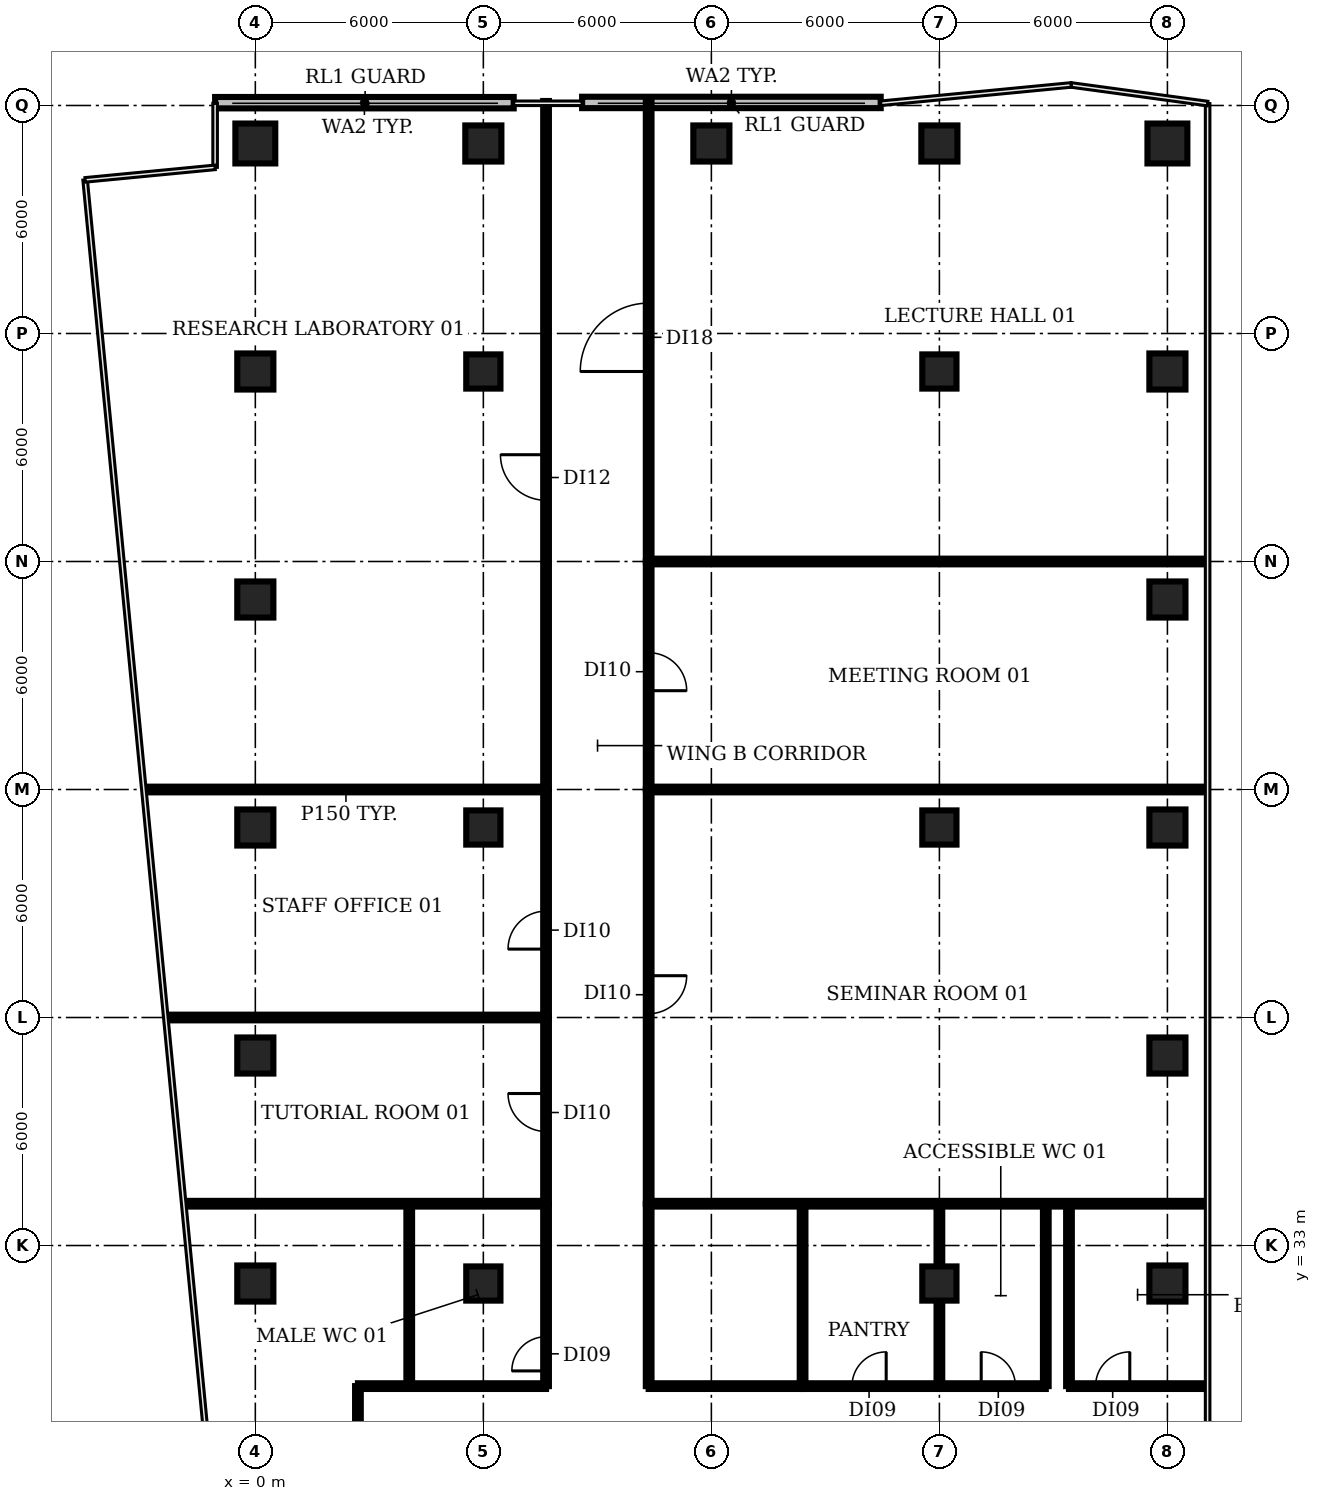
"""IFC4 building model, lengths in metres.
Left out: names, types, materials, properties, quantities, classifications, styles, units other than length and angle.
Written with IfcOpenShell. Run it as: python <this file> out.ifc"""

import sys

from ifc_helpers import new_model, si_unit, direction, frame, frame_2d, origin, origin_2d, place, context, subcontext, project, spatial, rectangle, circle, extrude, element, fill, save


model = new_model("IFC4")
c1 = context("Model", 3, precision=1e-05, world=origin(), true_north=direction((0.0, 1.0)))
c2 = subcontext(c1, "Body", "Model", "MODEL_VIEW")
j1 = project(units=[si_unit("LENGTHUNIT", "METRE"), si_unit("PLANEANGLEUNIT", "RADIAN")], contexts=[c1])
p1 = place(None, origin())
s1 = spatial("IfcSite", under=j1, at=p1, CompositionType="ELEMENT")
p2 = place(p1, origin())
s2 = spatial("IfcBuilding", under=s1, at=p2, CompositionType="ELEMENT")
p3 = place(p2, frame((0.0, 0.0, 192.8)))
s3 = spatial("IfcBuildingStorey", under=s2, at=p3, CompositionType="ELEMENT", Elevation=192.8)
for number, where, z_axis, x_axis in (
    (1, (0.0, 32.0, 0.0), (0.0, 0.0, 1.0), (1.0, 0.0, 0.0)),
    (2, (0.0, 38.0, 0.0), (0.0, 0.0, 1.0), (1.0, 0.0, 0.0)),
    (3, (0.0, 44.0, 0.0), (0.0, 0.0, 1.0), (1.0, 0.0, 0.0)),
    (4, (0.0, 50.0, 0.0), (0.0, 0.0, 1.0), (1.0, 0.0, 0.0)),
    (5, (0.0, 56.0, 0.0), (0.0, 0.0, 1.0), (1.0, 0.0, 0.0)),
):
    element("IfcColumn", number, at=place(p3, frame(where, z_axis=z_axis, x_axis=x_axis)), inside=s3, PredefinedType="COLUMN", context=c2, shape_type="SweptSolid", body=[
        extrude(rectangle(XDim=0.95, YDim=0.95, at=origin_2d()), origin(), (0.0, 0.0, 1.0), 3.2),
    ])
p4 = place(p3, frame((0.0, 62.0, 0.0), z_axis=(0.0, 0.0, 1.0), x_axis=(1.0, 0.0, 0.0)))
e6 = element("IfcColumn", 6, at=p4, inside=s3, PredefinedType="COLUMN", context=c2, shape_type="SweptSolid", body=[
    extrude(circle(Radius=0.525, at=origin_2d()), origin(), (0.0, 0.0, 1.0), 3.2),
])
for number, where, z_axis, x_axis in (
    (7, (6.0, 32.0, 0.0), (0.0, 0.0, 1.0), (1.0, 0.0, 0.0)),
    (8, (6.0, 44.0, 0.0), (0.0, 0.0, 1.0), (1.0, 0.0, 0.0)),
    (9, (6.0, 56.0, 0.0), (0.0, 0.0, 1.0), (1.0, 0.0, 0.0)),
):
    element("IfcColumn", number, at=place(p3, frame(where, z_axis=z_axis, x_axis=x_axis)), inside=s3, PredefinedType="COLUMN", context=c2, shape_type="SweptSolid", body=[
        extrude(rectangle(XDim=0.9, YDim=0.9, at=origin_2d()), origin(), (0.0, 0.0, 1.0), 3.2),
    ])
for number, where, z_axis, x_axis in (
    (10, (6.0, 62.0, 0.0), (0.0, 0.0, 1.0), (1.0, 0.0, 0.0)),
    (11, (12.0, 62.0, 0.0), (0.0, 0.0, 1.0), (1.0, 0.0, 0.0)),
):
    element("IfcColumn", number, at=place(p3, frame(where, z_axis=z_axis, x_axis=x_axis)), inside=s3, PredefinedType="COLUMN", context=c2, shape_type="SweptSolid", body=[
        extrude(rectangle(XDim=0.95, YDim=0.95, at=origin_2d()), origin(), (0.0, 0.0, 1.0), 3.2),
    ])
for number, where, z_axis, x_axis in (
    (12, (18.0, 32.0, 0.0), (0.0, 0.0, 1.0), (1.0, 0.0, 0.0)),
    (13, (18.0, 44.0, 0.0), (0.0, 0.0, 1.0), (1.0, 0.0, 0.0)),
    (14, (18.0, 56.0, 0.0), (0.0, 0.0, 1.0), (1.0, 0.0, 0.0)),
):
    element("IfcColumn", number, at=place(p3, frame(where, z_axis=z_axis, x_axis=x_axis)), inside=s3, PredefinedType="COLUMN", context=c2, shape_type="SweptSolid", body=[
        extrude(rectangle(XDim=0.9, YDim=0.9, at=origin_2d()), origin(), (0.0, 0.0, 1.0), 3.2),
    ])
for number, where, z_axis, x_axis in (
    (15, (18.0, 62.0, 0.0), (0.0, 0.0, 1.0), (1.0, 0.0, 0.0)),
    (16, (24.0, 32.0, 0.0), (0.0, 0.0, 1.0), (1.0, 0.0, 0.0)),
    (17, (24.0, 38.0, 0.0), (0.0, 0.0, 1.0), (1.0, 0.0, 0.0)),
    (18, (24.0, 44.0, 0.0), (0.0, 0.0, 1.0), (1.0, 0.0, 0.0)),
    (19, (24.0, 50.0, 0.0), (0.0, 0.0, 1.0), (1.0, 0.0, 0.0)),
    (20, (24.0, 56.0, 0.0), (0.0, 0.0, 1.0), (1.0, 0.0, 0.0)),
):
    element("IfcColumn", number, at=place(p3, frame(where, z_axis=z_axis, x_axis=x_axis)), inside=s3, PredefinedType="COLUMN", context=c2, shape_type="SweptSolid", body=[
        extrude(rectangle(XDim=0.95, YDim=0.95, at=origin_2d()), origin(), (0.0, 0.0, 1.0), 3.2),
    ])
p5 = place(p3, frame((24.0, 62.0, 0.0), z_axis=(0.0, 0.0, 1.0), x_axis=(1.0, 0.0, 0.0)))
e21 = element("IfcColumn", 21, at=p5, inside=s3, PredefinedType="COLUMN", context=c2, shape_type="SweptSolid", body=[
    extrude(circle(Radius=0.525, at=origin_2d()), origin(), (0.0, 0.0, 1.0), 3.2),
])
for number, where, z_axis, x_axis in (
    (22, (16.456, 63.08, 0.0), (0.0, 0.0, 1.0), (-1.0, 0.0, 0.0)),
    (23, (6.799, 63.074, 0.0), (0.0, 0.0, 1.0), (-1.0, 0.0, 0.0)),
):
    element("IfcWall", number, at=place(p3, frame(where, z_axis=z_axis, x_axis=x_axis)), inside=s3, PredefinedType="SOLIDWALL", context=c2, shape_type="SweptSolid", body=[
        extrude(rectangle(XDim=7.857, YDim=0.3, at=frame_2d((3.928, 0.0))), origin(), (0.0, 0.0, 1.0), 3.8),
    ])
p6 = place(p3, frame((-2.88, 45.0, 0.0), z_axis=(0.0, 0.0, 1.0), x_axis=(1.0, 0.0, 0.0)))
e24 = element("IfcWall", 24, at=p6, inside=s3, PredefinedType="PARTITIONING", context=c2, shape_type="SweptSolid", body=[
    extrude(rectangle(XDim=10.53, YDim=0.15, at=frame_2d((5.265, 0.0))), origin(), (0.0, 0.0, 1.0), 2.83),
])
p7 = place(p3, frame((-2.31, 39.0, 0.0), z_axis=(0.0, 0.0, 1.0), x_axis=(1.0, 0.0, 0.0)))
e25 = element("IfcWall", 25, at=p7, inside=s3, PredefinedType="PARTITIONING", context=c2, shape_type="SweptSolid", body=[
    extrude(rectangle(XDim=9.96, YDim=0.15, at=frame_2d((4.98, 0.0))), origin(), (0.0, 0.0, 1.0), 2.83),
])
p8 = place(p3, frame((-1.83, 34.1, 0.0), z_axis=(0.0, 0.0, 1.0), x_axis=(1.0, 0.0, 0.0)))
e26 = element("IfcWall", 26, at=p8, inside=s3, PredefinedType="PARTITIONING", context=c2, shape_type="SweptSolid", body=[
    extrude(rectangle(XDim=9.48, YDim=0.15, at=frame_2d((4.74, 0.0))), origin(), (0.0, 0.0, 1.0), 2.83),
])
p9 = place(p3, frame((2.7, 25.4, 0.0), z_axis=(0.0, 0.0, 1.0), x_axis=(0.0, 1.0, 0.0)))
e27 = element("IfcWall", 27, at=p9, inside=s3, PredefinedType="PARTITIONING", context=c2, shape_type="SweptSolid", body=[
    extrude(rectangle(XDim=3.9, YDim=0.15, at=frame_2d((1.95, 0.0))), origin(), (0.0, 0.0, 1.0), 2.83),
])
p10 = place(p3, frame((2.7, 29.3, 0.0), z_axis=(0.0, 0.0, 1.0), x_axis=(1.0, 0.0, 0.0)))
e28 = element("IfcWall", 28, at=p10, inside=s3, PredefinedType="PARTITIONING", context=c2, shape_type="SweptSolid", body=[
    extrude(rectangle(XDim=4.95, YDim=0.15, at=frame_2d((2.475, 0.0))), origin(), (0.0, 0.0, 1.0), 2.83),
])
p11 = place(p3, frame((4.05, 29.3, 0.0), z_axis=(0.0, 0.0, 1.0), x_axis=(0.0, 1.0, 0.0)))
e29 = element("IfcWall", 29, at=p11, inside=s3, PredefinedType="PARTITIONING", context=c2, shape_type="SweptSolid", body=[
    extrude(rectangle(XDim=4.8, YDim=0.15, at=frame_2d((2.4, 0.0))), origin(), (0.0, 0.0, 1.0), 2.83),
])
p12 = place(p3, frame((7.65, 29.3, 0.0), z_axis=(0.0, 0.0, 1.0), x_axis=(0.0, 1.0, 0.0)))
e30 = element("IfcWall", 30, at=p12, inside=s3, PredefinedType="PARTITIONING", context=c2, shape_type="SweptSolid", body=[
    extrude(rectangle(XDim=4.8, YDim=0.15, at=frame_2d((2.4, 0.0))), origin(), (0.0, 0.0, 1.0), 2.83),
])
p13 = place(p12, frame((0.4, 0.0, 0.0)))
e31 = element("IfcOpeningElement", 31, at=p13, cuts=e30, PredefinedType="OPENING", context=c2, shape_type="SweptSolid", body=[
    extrude(rectangle(XDim=0.9, YDim=2.1, at=frame_2d((0.45, 1.05))), frame((0.0, 0.085, 0.0), z_axis=(0.0, -1.0, 0.0), x_axis=(1.0, 0.0, 0.0)), (0.0, 0.0, 1.0), 0.17),
])
p14 = place(p3, frame((7.65, 34.1, 0.0), z_axis=(0.0, 0.0, 1.0), x_axis=(0.0, 1.0, 0.0)))
e32 = element("IfcWall", 32, at=p14, inside=s3, PredefinedType="PARTITIONING", context=c2, shape_type="SweptSolid", body=[
    extrude(rectangle(XDim=4.9, YDim=0.15, at=frame_2d((2.45, 0.0))), origin(), (0.0, 0.0, 1.0), 2.83),
])
p15 = place(p14, frame((1.9, 0.0, 0.0)))
e33 = element("IfcOpeningElement", 33, at=p15, cuts=e32, PredefinedType="OPENING", context=c2, shape_type="SweptSolid", body=[
    extrude(rectangle(XDim=1.0, YDim=2.1, at=frame_2d((0.5, 1.05))), frame((0.0, 0.085, 0.0), z_axis=(0.0, -1.0, 0.0), x_axis=(1.0, 0.0, 0.0)), (0.0, 0.0, 1.0), 0.17),
])
p16 = place(p3, frame((7.65, 39.0, 0.0), z_axis=(0.0, 0.0, 1.0), x_axis=(0.0, 1.0, 0.0)))
e34 = element("IfcWall", 34, at=p16, inside=s3, PredefinedType="PARTITIONING", context=c2, shape_type="SweptSolid", body=[
    extrude(rectangle(XDim=6.0, YDim=0.15, at=frame_2d((3.0, 0.0))), origin(), (0.0, 0.0, 1.0), 2.83),
])
p17 = place(p16, frame((1.8, 0.0, 0.0)))
e35 = element("IfcOpeningElement", 35, at=p17, cuts=e34, PredefinedType="OPENING", context=c2, shape_type="SweptSolid", body=[
    extrude(rectangle(XDim=1.0, YDim=2.1, at=frame_2d((0.5, 1.05))), frame((0.0, 0.085, 0.0), z_axis=(0.0, -1.0, 0.0), x_axis=(1.0, 0.0, 0.0)), (0.0, 0.0, 1.0), 0.17),
])
p18 = place(p3, frame((7.65, 45.0, 0.0), z_axis=(0.0, 0.0, 1.0), x_axis=(0.0, 1.0, 0.0)))
e36 = element("IfcWall", 36, at=p18, inside=s3, PredefinedType="PARTITIONING", context=c2, shape_type="SweptSolid", body=[
    extrude(rectangle(XDim=18.118, YDim=0.15, at=frame_2d((9.059, 0.0))), origin(), (0.0, 0.0, 1.0), 2.83),
])
p19 = place(p18, frame((7.61, 0.0, 0.0)))
e37 = element("IfcOpeningElement", 37, at=p19, cuts=e36, PredefinedType="OPENING", context=c2, shape_type="SweptSolid", body=[
    extrude(rectangle(XDim=1.2, YDim=2.1, at=frame_2d((0.6, 1.05))), frame((0.0, 0.085, 0.0), z_axis=(0.0, -1.0, 0.0), x_axis=(1.0, 0.0, 0.0)), (0.0, 0.0, 1.0), 0.17),
])
p20 = place(p3, frame((10.35, 29.3, 0.0), z_axis=(0.0, 0.0, 1.0), x_axis=(0.0, 1.0, 0.0)))
e38 = element("IfcWall", 38, at=p20, inside=s3, PredefinedType="PARTITIONING", context=c2, shape_type="SweptSolid", body=[
    extrude(rectangle(XDim=4.8, YDim=0.15, at=frame_2d((2.4, 0.0))), origin(), (0.0, 0.0, 1.0), 2.83),
])
p21 = place(p3, frame((10.35, 29.3, 0.0), z_axis=(0.0, 0.0, 1.0), x_axis=(1.0, 0.0, 0.0)))
e39 = element("IfcWall", 39, at=p21, inside=s3, PredefinedType="PARTITIONING", context=c2, shape_type="SweptSolid", body=[
    extrude(rectangle(XDim=4.05, YDim=0.15, at=frame_2d((2.025, 0.0))), origin(), (0.0, 0.0, 1.0), 2.83),
])
p22 = place(p3, frame((10.35, 34.1, 0.0), z_axis=(0.0, 0.0, 1.0), x_axis=(1.0, 0.0, 0.0)))
e40 = element("IfcWall", 40, at=p22, inside=s3, PredefinedType="PARTITIONING", context=c2, shape_type="SweptSolid", body=[
    extrude(rectangle(XDim=14.66, YDim=0.15, at=frame_2d((7.33, 0.0))), origin(), (0.0, 0.0, 1.0), 2.83),
])
p23 = place(p3, frame((10.35, 45.0, 0.0), z_axis=(0.0, 0.0, 1.0), x_axis=(0.0, -1.0, 0.0)))
e41 = element("IfcWall", 41, at=p23, inside=s3, PredefinedType="PARTITIONING", context=c2, shape_type="SweptSolid", body=[
    extrude(rectangle(XDim=10.9, YDim=0.15, at=frame_2d((5.45, 0.0))), origin(), (0.0, 0.0, 1.0), 2.83),
])
p24 = place(p23, frame((4.9, 0.0, 0.0)))
e42 = element("IfcOpeningElement", 42, at=p24, cuts=e41, PredefinedType="OPENING", context=c2, shape_type="SweptSolid", body=[
    extrude(rectangle(XDim=1.0, YDim=2.1, at=frame_2d((0.5, 1.05))), frame((0.0, 0.085, 0.0), z_axis=(0.0, -1.0, 0.0), x_axis=(1.0, 0.0, 0.0)), (0.0, 0.0, 1.0), 0.17),
])
p25 = place(p3, frame((10.35, 45.0, 0.0), z_axis=(0.0, 0.0, 1.0), x_axis=(1.0, 0.0, 0.0)))
e43 = element("IfcWall", 43, at=p25, inside=s3, PredefinedType="PARTITIONING", context=c2, shape_type="SweptSolid", body=[
    extrude(rectangle(XDim=14.643, YDim=0.15, at=frame_2d((7.321, 0.0))), origin(), (0.0, 0.0, 1.0), 2.83),
])
p26 = place(p3, frame((10.35, 51.0, 0.0), z_axis=(0.0, 0.0, 1.0), x_axis=(0.0, -1.0, 0.0)))
e44 = element("IfcWall", 44, at=p26, inside=s3, PredefinedType="PARTITIONING", context=c2, shape_type="SweptSolid", body=[
    extrude(rectangle(XDim=6.0, YDim=0.15, at=frame_2d((3.0, 0.0))), origin(), (0.0, 0.0, 1.0), 2.83),
])
p27 = place(p26, frame((2.4, 0.0, 0.0)))
e45 = element("IfcOpeningElement", 45, at=p27, cuts=e44, PredefinedType="OPENING", context=c2, shape_type="SweptSolid", body=[
    extrude(rectangle(XDim=1.0, YDim=2.1, at=frame_2d((0.5, 1.05))), frame((0.0, 0.085, 0.0), z_axis=(0.0, -1.0, 0.0), x_axis=(1.0, 0.0, 0.0)), (0.0, 0.0, 1.0), 0.17),
])
p28 = place(p3, frame((10.35, 51.0, 0.0), z_axis=(0.0, 0.0, 1.0), x_axis=(0.0, 1.0, 0.0)))
e46 = element("IfcWall", 46, at=p28, inside=s3, PredefinedType="PARTITIONING", context=c2, shape_type="SweptSolid", body=[
    extrude(rectangle(XDim=12.118, YDim=0.15, at=frame_2d((6.059, 0.0))), origin(), (0.0, 0.0, 1.0), 2.83),
])
p29 = place(p28, frame((5.0, 0.0, 0.0)))
e47 = element("IfcOpeningElement", 47, at=p29, cuts=e46, PredefinedType="OPENING", context=c2, shape_type="SweptSolid", body=[
    extrude(rectangle(XDim=1.8, YDim=2.1, at=frame_2d((0.9, 1.05))), frame((0.0, 0.085, 0.0), z_axis=(0.0, -1.0, 0.0), x_axis=(1.0, 0.0, 0.0)), (0.0, 0.0, 1.0), 0.17),
])
p30 = place(p3, frame((10.35, 51.0, 0.0), z_axis=(0.0, 0.0, 1.0), x_axis=(1.0, 0.0, 0.0)))
e48 = element("IfcWall", 48, at=p30, inside=s3, PredefinedType="PARTITIONING", context=c2, shape_type="SweptSolid", body=[
    extrude(rectangle(XDim=14.643, YDim=0.15, at=frame_2d((7.321, 0.0))), origin(), (0.0, 0.0, 1.0), 2.83),
])
p31 = place(p3, frame((14.4, 29.3, 0.0), z_axis=(0.0, 0.0, 1.0), x_axis=(0.0, 1.0, 0.0)))
e49 = element("IfcWall", 49, at=p31, inside=s3, PredefinedType="PARTITIONING", context=c2, shape_type="SweptSolid", body=[
    extrude(rectangle(XDim=4.8, YDim=0.15, at=frame_2d((2.4, 0.0))), origin(), (0.0, 0.0, 1.0), 2.83),
])
p32 = place(p3, frame((14.4, 29.3, 0.0), z_axis=(0.0, 0.0, 1.0), x_axis=(1.0, 0.0, 0.0)))
e50 = element("IfcWall", 50, at=p32, inside=s3, PredefinedType="PARTITIONING", context=c2, shape_type="SweptSolid", body=[
    extrude(rectangle(XDim=3.6, YDim=0.15, at=frame_2d((1.8, 0.0))), origin(), (0.0, 0.0, 1.0), 2.83),
])
p33 = place(p32, frame((1.3, 0.0, 0.0)))
e51 = element("IfcOpeningElement", 51, at=p33, cuts=e50, PredefinedType="OPENING", context=c2, shape_type="SweptSolid", body=[
    extrude(rectangle(XDim=0.9, YDim=2.1, at=frame_2d((0.45, 1.05))), frame((0.0, 0.085, 0.0), z_axis=(0.0, -1.0, 0.0), x_axis=(1.0, 0.0, 0.0)), (0.0, 0.0, 1.0), 0.17),
])
p34 = place(p3, frame((18.0, 29.3, 0.0), z_axis=(0.0, 0.0, 1.0), x_axis=(0.0, 1.0, 0.0)))
e52 = element("IfcWall", 52, at=p34, inside=s3, PredefinedType="PARTITIONING", context=c2, shape_type="SweptSolid", body=[
    extrude(rectangle(XDim=4.8, YDim=0.15, at=frame_2d((2.4, 0.0))), origin(), (0.0, 0.0, 1.0), 2.83),
])
p35 = place(p3, frame((18.0, 29.3, 0.0), z_axis=(0.0, 0.0, 1.0), x_axis=(1.0, 0.0, 0.0)))
e53 = element("IfcWall", 53, at=p35, inside=s3, PredefinedType="PARTITIONING", context=c2, shape_type="SweptSolid", body=[
    extrude(rectangle(XDim=2.8, YDim=0.15, at=frame_2d((1.4, 0.0))), origin(), (0.0, 0.0, 1.0), 2.83),
])
p36 = place(p35, frame((1.1, 0.0, 0.0)))
e54 = element("IfcOpeningElement", 54, at=p36, cuts=e53, PredefinedType="OPENING", context=c2, shape_type="SweptSolid", body=[
    extrude(rectangle(XDim=0.9, YDim=2.1, at=frame_2d((0.45, 1.05))), frame((0.0, 0.085, 0.0), z_axis=(0.0, -1.0, 0.0), x_axis=(1.0, 0.0, 0.0)), (0.0, 0.0, 1.0), 0.17),
])
for number, where, z_axis, x_axis in (
    (55, (20.8, 29.3, 0.0), (0.0, 0.0, 1.0), (0.0, 1.0, 0.0)),
    (56, (21.41, 29.3, 0.0), (0.0, 0.0, 1.0), (0.0, 1.0, 0.0)),
):
    element("IfcWall", number, at=place(p3, frame(where, z_axis=z_axis, x_axis=x_axis)), inside=s3, PredefinedType="PARTITIONING", context=c2, shape_type="SweptSolid", body=[
        extrude(rectangle(XDim=4.8, YDim=0.15, at=frame_2d((2.4, 0.0))), origin(), (0.0, 0.0, 1.0), 2.83),
    ])
p37 = place(p3, frame((21.41, 29.3, 0.0), z_axis=(0.0, 0.0, 1.0), x_axis=(1.0, 0.0, 0.0)))
e57 = element("IfcWall", 57, at=p37, inside=s3, PredefinedType="PARTITIONING", context=c2, shape_type="SweptSolid", body=[
    extrude(rectangle(XDim=3.6, YDim=0.15, at=frame_2d((1.8, 0.0))), origin(), (0.0, 0.0, 1.0), 2.83),
])
p38 = place(p37, frame((0.7, 0.0, 0.0)))
e58 = element("IfcOpeningElement", 58, at=p38, cuts=e57, PredefinedType="OPENING", context=c2, shape_type="SweptSolid", body=[
    extrude(rectangle(XDim=0.9, YDim=2.1, at=frame_2d((0.45, 1.05))), frame((0.0, 0.085, 0.0), z_axis=(0.0, -1.0, 0.0), x_axis=(1.0, 0.0, 0.0)), (0.0, 0.0, 1.0), 0.17),
])
p39 = place(p13, origin())
e59 = element("IfcDoor", 59, at=p39, inside=s3, OperationType="SINGLE_SWING_LEFT", PredefinedType="DOOR", context=c2, shape_type="SweptSolid", body=[
    extrude(rectangle(XDim=0.9, YDim=2.1, at=frame_2d((0.45, 1.05))), frame((0.0, 0.025, 0.0), z_axis=(0.0, -1.0, 0.0), x_axis=(1.0, 0.0, 0.0)), (0.0, 0.0, 1.0), 0.05),
])
fill(e31, e59)
p40 = place(p15, origin())
e60 = element("IfcDoor", 60, at=p40, inside=s3, OperationType="SINGLE_SWING_RIGHT", PredefinedType="DOOR", context=c2, shape_type="SweptSolid", body=[
    extrude(rectangle(XDim=1.0, YDim=2.1, at=frame_2d((0.5, 1.05))), frame((0.0, 0.025, 0.0), z_axis=(0.0, -1.0, 0.0), x_axis=(1.0, 0.0, 0.0)), (0.0, 0.0, 1.0), 0.05),
])
fill(e33, e60)
p41 = place(p17, origin())
e61 = element("IfcDoor", 61, at=p41, inside=s3, OperationType="SINGLE_SWING_LEFT", PredefinedType="DOOR", context=c2, shape_type="SweptSolid", body=[
    extrude(rectangle(XDim=1.0, YDim=2.1, at=frame_2d((0.5, 1.05))), frame((0.0, 0.025, 0.0), z_axis=(0.0, -1.0, 0.0), x_axis=(1.0, 0.0, 0.0)), (0.0, 0.0, 1.0), 0.05),
])
fill(e35, e61)
p42 = place(p19, origin())
e62 = element("IfcDoor", 62, at=p42, inside=s3, OperationType="SINGLE_SWING_RIGHT", PredefinedType="DOOR", context=c2, shape_type="SweptSolid", body=[
    extrude(rectangle(XDim=1.2, YDim=2.1, at=frame_2d((0.6, 1.05))), frame((0.0, 0.025, 0.0), z_axis=(0.0, -1.0, 0.0), x_axis=(1.0, 0.0, 0.0)), (0.0, 0.0, 1.0), 0.05),
])
fill(e37, e62)
p43 = place(p24, origin())
e63 = element("IfcDoor", 63, at=p43, inside=s3, OperationType="SINGLE_SWING_LEFT", PredefinedType="DOOR", context=c2, shape_type="SweptSolid", body=[
    extrude(rectangle(XDim=1.0, YDim=2.1, at=frame_2d((0.5, 1.05))), frame((0.0, 0.025, 0.0), z_axis=(0.0, -1.0, 0.0), x_axis=(1.0, 0.0, 0.0)), (0.0, 0.0, 1.0), 0.05),
])
fill(e42, e63)
p44 = place(p27, origin())
e64 = element("IfcDoor", 64, at=p44, inside=s3, OperationType="SINGLE_SWING_RIGHT", PredefinedType="DOOR", context=c2, shape_type="SweptSolid", body=[
    extrude(rectangle(XDim=1.0, YDim=2.1, at=frame_2d((0.5, 1.05))), frame((0.0, 0.025, 0.0), z_axis=(0.0, -1.0, 0.0), x_axis=(1.0, 0.0, 0.0)), (0.0, 0.0, 1.0), 0.05),
])
fill(e45, e64)
p45 = place(p29, origin())
e65 = element("IfcDoor", 65, at=p45, inside=s3, OperationType="SINGLE_SWING_LEFT", PredefinedType="DOOR", context=c2, shape_type="SweptSolid", body=[
    extrude(rectangle(XDim=1.8, YDim=2.1, at=frame_2d((0.9, 1.05))), frame((0.0, 0.025, 0.0), z_axis=(0.0, -1.0, 0.0), x_axis=(1.0, 0.0, 0.0)), (0.0, 0.0, 1.0), 0.05),
])
fill(e47, e65)
p46 = place(p33, origin())
e66 = element("IfcDoor", 66, at=p46, inside=s3, OperationType="SINGLE_SWING_RIGHT", PredefinedType="DOOR", context=c2, shape_type="SweptSolid", body=[
    extrude(rectangle(XDim=0.9, YDim=2.1, at=frame_2d((0.45, 1.05))), frame((0.0, 0.025, 0.0), z_axis=(0.0, -1.0, 0.0), x_axis=(1.0, 0.0, 0.0)), (0.0, 0.0, 1.0), 0.05),
])
fill(e51, e66)
p47 = place(p36, origin())
e67 = element("IfcDoor", 67, at=p47, inside=s3, OperationType="SINGLE_SWING_LEFT", PredefinedType="DOOR", context=c2, shape_type="SweptSolid", body=[
    extrude(rectangle(XDim=0.9, YDim=2.1, at=frame_2d((0.45, 1.05))), frame((0.0, 0.025, 0.0), z_axis=(0.0, -1.0, 0.0), x_axis=(1.0, 0.0, 0.0)), (0.0, 0.0, 1.0), 0.05),
])
fill(e54, e67)
p48 = place(p38, origin())
e68 = element("IfcDoor", 68, at=p48, inside=s3, OperationType="SINGLE_SWING_RIGHT", PredefinedType="DOOR", context=c2, shape_type="SweptSolid", body=[
    extrude(rectangle(XDim=0.9, YDim=2.1, at=frame_2d((0.45, 1.05))), frame((0.0, 0.025, 0.0), z_axis=(0.0, -1.0, 0.0), x_axis=(1.0, 0.0, 0.0)), (0.0, 0.0, 1.0), 0.05),
])
fill(e58, e68)
save(model, sys.argv[1])
